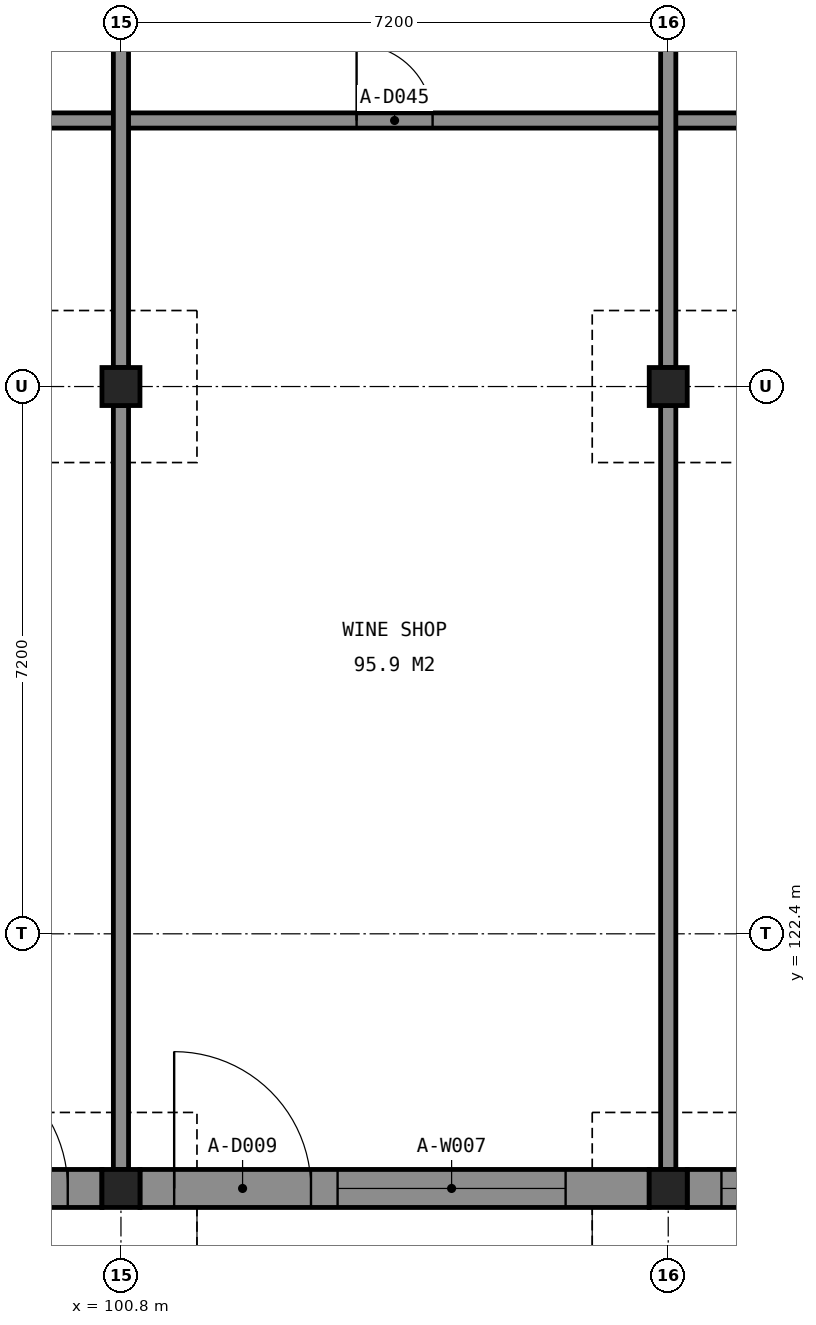
"""IFC4 building model, lengths in metres.
Left out: names, types, materials, properties, quantities, classifications, styles, units other than length and angle.
Written with IfcOpenShell. Run it as: python <this file> out.ifc"""

import sys

from ifc_helpers import new_model, si_unit, direction, frame, frame_2d, origin, origin_2d, place, context, subcontext, project, spatial, rectangle, extrude, element, fill, save


model = new_model("IFC4")
c1 = context("Model", 3, precision=1e-05, world=origin(), true_north=direction((0.0, 1.0)))
c2 = subcontext(c1, "Body", "Model", "MODEL_VIEW")
j1 = project(units=[si_unit("LENGTHUNIT", "METRE"), si_unit("PLANEANGLEUNIT", "RADIAN")], contexts=[c1])
p1 = place(None, origin())
s1 = spatial("IfcSite", under=j1, at=p1, CompositionType="ELEMENT")
p2 = place(p1, origin())
s2 = spatial("IfcBuilding", under=s1, at=p2, CompositionType="ELEMENT")
p3 = place(p2, origin())
s3 = spatial("IfcBuildingStorey", under=s2, at=p3, CompositionType="ELEMENT", Elevation=0.0)
for number, where, z_axis, x_axis in (
    (1, (100.8, 119.05, 0.0), (0.0, 0.0, 1.0), (1.0, 0.0, 0.0)),
    (2, (108.0, 119.05, 0.0), (0.0, 0.0, 1.0), (1.0, 0.0, 0.0)),
    (3, (100.8, 129.6, 0.0), (0.0, 0.0, 1.0), (1.0, 0.0, 0.0)),
    (4, (108.0, 129.6, 0.0), (0.0, 0.0, 1.0), (1.0, 0.0, 0.0)),
):
    element("IfcColumn", number, at=place(p3, frame(where, z_axis=z_axis, x_axis=x_axis)), inside=s3, PredefinedType="COLUMN", context=c2, shape_type="SweptSolid", body=[
        extrude(rectangle(XDim=0.5, YDim=0.5, at=origin_2d()), origin(), (0.0, 0.0, 1.0), 3.7),
    ])
p4 = place(p3, frame((93.85, 119.05, 0.0), z_axis=(0.0, 0.0, 1.0), x_axis=(1.0, 0.0, 0.0)))
e5 = element("IfcWall", 5, at=p4, inside=s3, PredefinedType="SOLIDWALL", context=c2, shape_type="SweptSolid", body=[
    extrude(rectangle(XDim=6.7, YDim=0.5, at=frame_2d((3.35, 0.0))), origin(), (0.0, 0.0, 1.0), 3.6),
])
p5 = place(p4, frame((4.45, 0.0, 0.0)))
e6 = element("IfcOpeningElement", 6, at=p5, cuts=e5, PredefinedType="OPENING", context=c2, shape_type="SweptSolid", body=[
    extrude(rectangle(XDim=1.8, YDim=2.4, at=frame_2d((0.9, 1.2))), frame((0.0, 0.26, 0.0), z_axis=(0.0, -1.0, 0.0), x_axis=(1.0, 0.0, 0.0)), (0.0, 0.0, 1.0), 0.52),
])
p6 = place(p4, frame((0.45, 0.0, 0.6)))
e7 = element("IfcOpeningElement", 7, at=p6, cuts=e5, PredefinedType="OPENING", context=c2, shape_type="SweptSolid", body=[
    extrude(rectangle(XDim=3.0, YDim=2.4, at=frame_2d((1.5, 1.2))), frame((0.0, 0.26, 0.0), z_axis=(0.0, -1.0, 0.0), x_axis=(1.0, 0.0, 0.0)), (0.0, 0.0, 1.0), 0.52),
])
p7 = place(p3, frame((101.05, 119.05, 0.0), z_axis=(0.0, 0.0, 1.0), x_axis=(1.0, 0.0, 0.0)))
e8 = element("IfcWall", 8, at=p7, inside=s3, PredefinedType="SOLIDWALL", context=c2, shape_type="SweptSolid", body=[
    extrude(rectangle(XDim=6.7, YDim=0.5, at=frame_2d((3.35, 0.0))), origin(), (0.0, 0.0, 1.0), 3.6),
])
p8 = place(p7, frame((0.45, 0.0, 0.0)))
e9 = element("IfcOpeningElement", 9, at=p8, cuts=e8, PredefinedType="OPENING", context=c2, shape_type="SweptSolid", body=[
    extrude(rectangle(XDim=1.8, YDim=2.4, at=frame_2d((0.9, 1.2))), frame((0.0, 0.26, 0.0), z_axis=(0.0, -1.0, 0.0), x_axis=(1.0, 0.0, 0.0)), (0.0, 0.0, 1.0), 0.52),
])
p9 = place(p7, frame((2.6, 0.0, 0.6)))
e10 = element("IfcOpeningElement", 10, at=p9, cuts=e8, PredefinedType="OPENING", context=c2, shape_type="SweptSolid", body=[
    extrude(rectangle(XDim=3.0, YDim=2.4, at=frame_2d((1.5, 1.2))), frame((0.0, 0.26, 0.0), z_axis=(0.0, -1.0, 0.0), x_axis=(1.0, 0.0, 0.0)), (0.0, 0.0, 1.0), 0.52),
])
p10 = place(p3, frame((108.25, 119.05, 0.0), z_axis=(0.0, 0.0, 1.0), x_axis=(1.0, 0.0, 0.0)))
e11 = element("IfcWall", 11, at=p10, inside=s3, PredefinedType="SOLIDWALL", context=c2, shape_type="SweptSolid", body=[
    extrude(rectangle(XDim=6.7, YDim=0.5, at=frame_2d((3.35, 0.0))), origin(), (0.0, 0.0, 1.0), 3.6),
])
p11 = place(p10, frame((4.45, 0.0, 0.0)))
e12 = element("IfcOpeningElement", 12, at=p11, cuts=e11, PredefinedType="OPENING", context=c2, shape_type="SweptSolid", body=[
    extrude(rectangle(XDim=1.8, YDim=2.4, at=frame_2d((0.9, 1.2))), frame((0.0, 0.26, 0.0), z_axis=(0.0, -1.0, 0.0), x_axis=(1.0, 0.0, 0.0)), (0.0, 0.0, 1.0), 0.52),
])
p12 = place(p10, frame((0.45, 0.0, 0.6)))
e13 = element("IfcOpeningElement", 13, at=p12, cuts=e11, PredefinedType="OPENING", context=c2, shape_type="SweptSolid", body=[
    extrude(rectangle(XDim=3.0, YDim=2.4, at=frame_2d((1.5, 1.2))), frame((0.0, 0.26, 0.0), z_axis=(0.0, -1.0, 0.0), x_axis=(1.0, 0.0, 0.0)), (0.0, 0.0, 1.0), 0.52),
])
p13 = place(p3, frame((57.7, 133.1, 0.0), z_axis=(0.0, 0.0, 1.0), x_axis=(1.0, 0.0, 0.0)))
e14 = element("IfcWall", 14, at=p13, inside=s3, PredefinedType="PARTITIONING", context=c2, shape_type="SweptSolid", body=[
    extrude(rectangle(XDim=86.2, YDim=0.2, at=frame_2d((43.1, 0.0))), origin(), (0.0, 0.0, 1.0), 3.5),
])
p14 = place(p13, frame((3.0, 0.0, 0.0)))
e15 = element("IfcOpeningElement", 15, at=p14, cuts=e14, PredefinedType="OPENING", context=c2, shape_type="SweptSolid", body=[
    extrude(rectangle(XDim=1.0, YDim=2.1, at=frame_2d((0.5, 1.05))), frame((0.0, 0.11, 0.0), z_axis=(0.0, -1.0, 0.0), x_axis=(1.0, 0.0, 0.0)), (0.0, 0.0, 1.0), 0.22),
])
p15 = place(p13, frame((10.2, 0.0, 0.0)))
e16 = element("IfcOpeningElement", 16, at=p15, cuts=e14, PredefinedType="OPENING", context=c2, shape_type="SweptSolid", body=[
    extrude(rectangle(XDim=1.0, YDim=2.1, at=frame_2d((0.5, 1.05))), frame((0.0, 0.11, 0.0), z_axis=(0.0, -1.0, 0.0), x_axis=(1.0, 0.0, 0.0)), (0.0, 0.0, 1.0), 0.22),
])
p16 = place(p13, frame((17.4, 0.0, 0.0)))
e17 = element("IfcOpeningElement", 17, at=p16, cuts=e14, PredefinedType="OPENING", context=c2, shape_type="SweptSolid", body=[
    extrude(rectangle(XDim=1.0, YDim=2.1, at=frame_2d((0.5, 1.05))), frame((0.0, 0.11, 0.0), z_axis=(0.0, -1.0, 0.0), x_axis=(1.0, 0.0, 0.0)), (0.0, 0.0, 1.0), 0.22),
])
p17 = place(p13, frame((24.6, 0.0, 0.0)))
e18 = element("IfcOpeningElement", 18, at=p17, cuts=e14, PredefinedType="OPENING", context=c2, shape_type="SweptSolid", body=[
    extrude(rectangle(XDim=1.0, YDim=2.1, at=frame_2d((0.5, 1.05))), frame((0.0, 0.11, 0.0), z_axis=(0.0, -1.0, 0.0), x_axis=(1.0, 0.0, 0.0)), (0.0, 0.0, 1.0), 0.22),
])
p18 = place(p13, frame((31.8, 0.0, 0.0)))
e19 = element("IfcOpeningElement", 19, at=p18, cuts=e14, PredefinedType="OPENING", context=c2, shape_type="SweptSolid", body=[
    extrude(rectangle(XDim=1.0, YDim=2.1, at=frame_2d((0.5, 1.05))), frame((0.0, 0.11, 0.0), z_axis=(0.0, -1.0, 0.0), x_axis=(1.0, 0.0, 0.0)), (0.0, 0.0, 1.0), 0.22),
])
p19 = place(p13, frame((39.0, 0.0, 0.0)))
e20 = element("IfcOpeningElement", 20, at=p19, cuts=e14, PredefinedType="OPENING", context=c2, shape_type="SweptSolid", body=[
    extrude(rectangle(XDim=1.0, YDim=2.1, at=frame_2d((0.5, 1.05))), frame((0.0, 0.11, 0.0), z_axis=(0.0, -1.0, 0.0), x_axis=(1.0, 0.0, 0.0)), (0.0, 0.0, 1.0), 0.22),
])
p20 = place(p13, frame((46.2, 0.0, 0.0)))
e21 = element("IfcOpeningElement", 21, at=p20, cuts=e14, PredefinedType="OPENING", context=c2, shape_type="SweptSolid", body=[
    extrude(rectangle(XDim=1.0, YDim=2.1, at=frame_2d((0.5, 1.05))), frame((0.0, 0.11, 0.0), z_axis=(0.0, -1.0, 0.0), x_axis=(1.0, 0.0, 0.0)), (0.0, 0.0, 1.0), 0.22),
])
p21 = place(p13, frame((53.4, 0.0, 0.0)))
e22 = element("IfcOpeningElement", 22, at=p21, cuts=e14, PredefinedType="OPENING", context=c2, shape_type="SweptSolid", body=[
    extrude(rectangle(XDim=1.0, YDim=2.1, at=frame_2d((0.5, 1.05))), frame((0.0, 0.11, 0.0), z_axis=(0.0, -1.0, 0.0), x_axis=(1.0, 0.0, 0.0)), (0.0, 0.0, 1.0), 0.22),
])
p22 = place(p13, frame((60.6, 0.0, 0.0)))
e23 = element("IfcOpeningElement", 23, at=p22, cuts=e14, PredefinedType="OPENING", context=c2, shape_type="SweptSolid", body=[
    extrude(rectangle(XDim=1.0, YDim=2.1, at=frame_2d((0.5, 1.05))), frame((0.0, 0.11, 0.0), z_axis=(0.0, -1.0, 0.0), x_axis=(1.0, 0.0, 0.0)), (0.0, 0.0, 1.0), 0.22),
])
p23 = place(p13, frame((67.8, 0.0, 0.0)))
e24 = element("IfcOpeningElement", 24, at=p23, cuts=e14, PredefinedType="OPENING", context=c2, shape_type="SweptSolid", body=[
    extrude(rectangle(XDim=1.0, YDim=2.1, at=frame_2d((0.5, 1.05))), frame((0.0, 0.11, 0.0), z_axis=(0.0, -1.0, 0.0), x_axis=(1.0, 0.0, 0.0)), (0.0, 0.0, 1.0), 0.22),
])
p24 = place(p13, frame((75.0, 0.0, 0.0)))
e25 = element("IfcOpeningElement", 25, at=p24, cuts=e14, PredefinedType="OPENING", context=c2, shape_type="SweptSolid", body=[
    extrude(rectangle(XDim=1.0, YDim=2.1, at=frame_2d((0.5, 1.05))), frame((0.0, 0.11, 0.0), z_axis=(0.0, -1.0, 0.0), x_axis=(1.0, 0.0, 0.0)), (0.0, 0.0, 1.0), 0.22),
])
p25 = place(p13, frame((84.65, 0.0, 0.0)))
e26 = element("IfcOpeningElement", 26, at=p25, cuts=e14, PredefinedType="OPENING", context=c2, shape_type="SweptSolid", body=[
    extrude(rectangle(XDim=0.9, YDim=2.1, at=frame_2d((0.45, 1.05))), frame((0.0, 0.11, 0.0), z_axis=(0.0, -1.0, 0.0), x_axis=(1.0, 0.0, 0.0)), (0.0, 0.0, 1.0), 0.22),
])
p26 = place(p3, frame((100.8, 119.3, 0.0), z_axis=(0.0, 0.0, 1.0), x_axis=(0.0, 1.0, 0.0)))
e27 = element("IfcWall", 27, at=p26, inside=s3, PredefinedType="PARTITIONING", context=c2, shape_type="SweptSolid", body=[
    extrude(rectangle(XDim=10.05, YDim=0.2, at=frame_2d((5.025, 0.0))), origin(), (0.0, 0.0, 1.0), 3.5),
])
p27 = place(p3, frame((100.8, 129.85, 0.0), z_axis=(0.0, 0.0, 1.0), x_axis=(0.0, 1.0, 0.0)))
e28 = element("IfcWall", 28, at=p27, inside=s3, PredefinedType="PARTITIONING", context=c2, shape_type="SweptSolid", body=[
    extrude(rectangle(XDim=7.95, YDim=0.2, at=frame_2d((3.975, 0.0))), origin(), (0.0, 0.0, 1.0), 3.5),
])
p28 = place(p3, frame((108.0, 119.3, 0.0), z_axis=(0.0, 0.0, 1.0), x_axis=(0.0, 1.0, 0.0)))
e29 = element("IfcWall", 29, at=p28, inside=s3, PredefinedType="PARTITIONING", context=c2, shape_type="SweptSolid", body=[
    extrude(rectangle(XDim=10.05, YDim=0.2, at=frame_2d((5.025, 0.0))), origin(), (0.0, 0.0, 1.0), 3.5),
])
p29 = place(p3, frame((108.0, 129.85, 0.0), z_axis=(0.0, 0.0, 1.0), x_axis=(0.0, 1.0, 0.0)))
e30 = element("IfcWall", 30, at=p29, inside=s3, PredefinedType="PARTITIONING", context=c2, shape_type="SweptSolid", body=[
    extrude(rectangle(XDim=7.95, YDim=0.2, at=frame_2d((3.975, 0.0))), origin(), (0.0, 0.0, 1.0), 3.5),
])
p30 = place(p5, origin())
e31 = element("IfcDoor", 31, at=p30, inside=s3, OperationType="DOUBLE_DOOR_DOUBLE_SWING", PredefinedType="DOOR", context=c2, shape_type="SweptSolid", body=[
    extrude(rectangle(XDim=1.8, YDim=2.4, at=frame_2d((0.9, 1.2))), frame((0.0, 0.025, 0.0), z_axis=(0.0, -1.0, 0.0), x_axis=(1.0, 0.0, 0.0)), (0.0, 0.0, 1.0), 0.05),
])
fill(e6, e31)
p31 = place(p8, origin())
e32 = element("IfcDoor", 32, at=p31, inside=s3, OperationType="DOUBLE_DOOR_DOUBLE_SWING", PredefinedType="DOOR", context=c2, shape_type="SweptSolid", body=[
    extrude(rectangle(XDim=1.8, YDim=2.4, at=frame_2d((0.9, 1.2))), frame((0.0, 0.025, 0.0), z_axis=(0.0, -1.0, 0.0), x_axis=(1.0, 0.0, 0.0)), (0.0, 0.0, 1.0), 0.05),
])
fill(e9, e32)
p32 = place(p9, origin())
e33 = element("IfcWindow", 33, at=p32, inside=s3, PartitioningType="SINGLE_PANEL", PredefinedType="WINDOW", context=c2, shape_type="SweptSolid", body=[
    extrude(rectangle(XDim=3.0, YDim=2.4, at=frame_2d((1.5, 1.2))), frame((0.0, 0.03, 0.0), z_axis=(0.0, -1.0, 0.0), x_axis=(1.0, 0.0, 0.0)), (0.0, 0.0, 1.0), 0.06),
])
fill(e10, e33)
p33 = place(p12, origin())
e34 = element("IfcWindow", 34, at=p33, inside=s3, PartitioningType="SINGLE_PANEL", PredefinedType="WINDOW", context=c2, shape_type="SweptSolid", body=[
    extrude(rectangle(XDim=3.0, YDim=2.4, at=frame_2d((1.5, 1.2))), frame((0.0, 0.03, 0.0), z_axis=(0.0, -1.0, 0.0), x_axis=(1.0, 0.0, 0.0)), (0.0, 0.0, 1.0), 0.06),
])
fill(e13, e34)
p34 = place(p20, origin())
e35 = element("IfcDoor", 35, at=p34, inside=s3, OperationType="SINGLE_SWING_LEFT", PredefinedType="DOOR", context=c2, shape_type="SweptSolid", body=[
    extrude(rectangle(XDim=1.0, YDim=2.1, at=frame_2d((0.5, 1.05))), frame((0.0, 0.025, 0.0), z_axis=(0.0, -1.0, 0.0), x_axis=(1.0, 0.0, 0.0)), (0.0, 0.0, 1.0), 0.05),
])
fill(e21, e35)
save(model, sys.argv[1])
